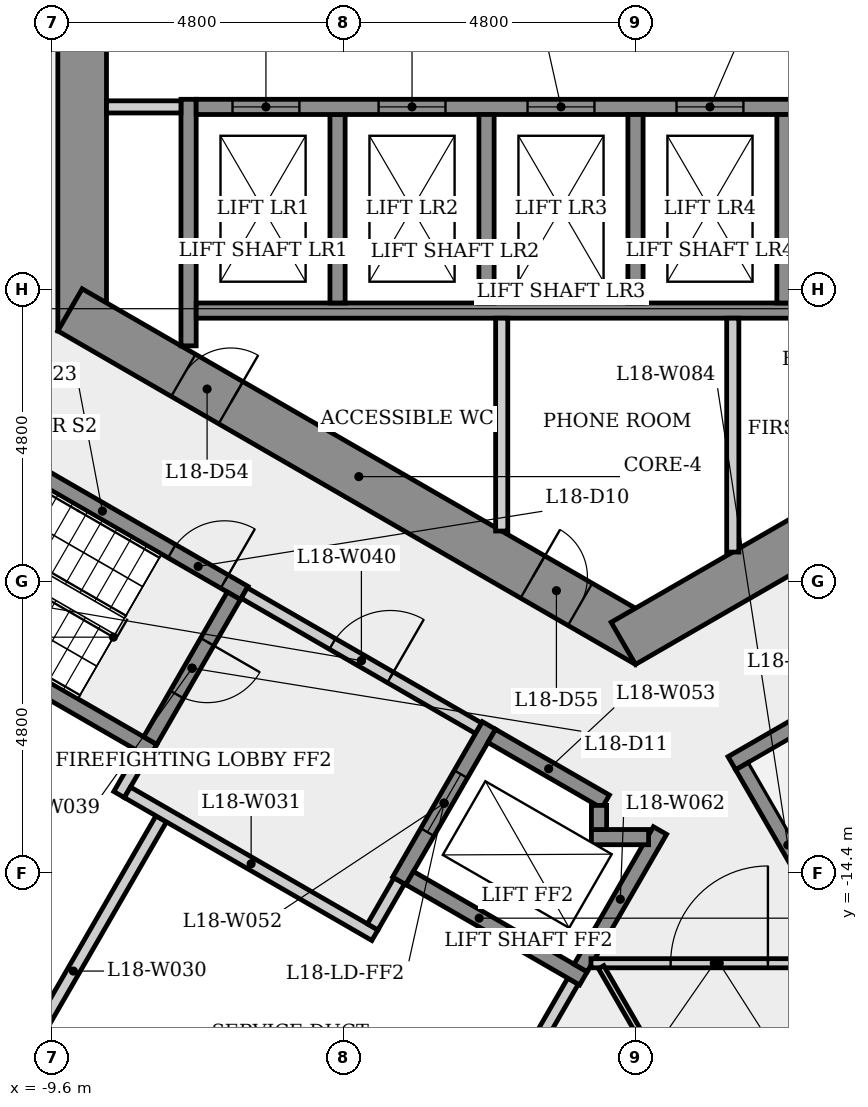
"""IFC4 building model, lengths in metres.
Left out: names, types, materials, properties, quantities, classifications, styles, units other than length and angle.
Written with IfcOpenShell. Run it as: python <this file> out.ifc"""

import sys

from ifc_helpers import new_model, si_unit, direction, frame, frame_2d, origin, place, context, subcontext, project, spatial, rectangle, extrude, element, fill, save


model = new_model("IFC4")
c1 = context("Model", 3, precision=1e-05, world=origin(), true_north=direction((0.0, 1.0)))
c2 = subcontext(c1, "Body", "Model", "MODEL_VIEW")
j1 = project(units=[si_unit("LENGTHUNIT", "METRE"), si_unit("PLANEANGLEUNIT", "RADIAN")], contexts=[c1])
p1 = place(None, origin())
s1 = spatial("IfcSite", under=j1, at=p1, CompositionType="ELEMENT")
p2 = place(p1, origin())
s2 = spatial("IfcBuilding", under=s1, at=p2, CompositionType="ELEMENT")
p3 = place(p2, frame((0.0, 0.0, 70.3)))
s3 = spatial("IfcBuildingStorey", under=s2, at=p3, CompositionType="ELEMENT", Elevation=70.3)
p4 = place(p3, frame((-9.1, 5.485, 0.0), z_axis=(0.0, 0.0, 1.0), x_axis=(0.0, -1.0, 0.0)))
e1 = element("IfcWall", 1, at=p4, inside=s3, PredefinedType="SHEAR", context=c2, shape_type="SweptSolid", body=[
    extrude(rectangle(XDim=10.97, YDim=0.8, at=frame_2d((5.485, 0.0))), origin(), (0.0, 0.0, 1.0), 4.0),
])
p5 = place(p4, frame((4.685, 0.0, 0.0)))
e2 = element("IfcOpeningElement", 2, at=p5, cuts=e1, PredefinedType="OPENING", context=c2, shape_type="SweptSolid", body=[
    extrude(rectangle(XDim=1.6, YDim=2.1, at=frame_2d((0.8, 1.05))), frame((0.0, 0.41, 0.0), z_axis=(0.0, -1.0, 0.0), x_axis=(1.0, 0.0, 0.0)), (0.0, 0.0, 1.0), 0.82),
])
p6 = place(p3, frame((-9.3, -5.138, 0.0), z_axis=(0.0, 0.0, 1.0), x_axis=(0.866023993627, -0.500002442456, 0.0)))
e3 = element("IfcWall", 3, at=p6, inside=s3, PredefinedType="SHEAR", context=c2, shape_type="SweptSolid", body=[
    extrude(rectangle(XDim=10.97, YDim=0.8, at=frame_2d((5.485, 0.0))), origin(), (0.0, 0.0, 1.0), 4.0),
])
p7 = place(p6, frame((2.153, 0.0, 0.0)))
e4 = element("IfcOpeningElement", 4, at=p7, cuts=e3, PredefinedType="OPENING", context=c2, shape_type="SweptSolid", body=[
    extrude(rectangle(XDim=0.9, YDim=2.1, at=frame_2d((0.45, 1.05))), frame((0.0, 0.41, 0.0), z_axis=(0.0, -1.0, 0.0), x_axis=(1.0, 0.0, 0.0)), (0.0, 0.0, 1.0), 0.82),
])
p8 = place(p6, frame((8.787, 0.0, 0.0)))
e5 = element("IfcOpeningElement", 5, at=p8, cuts=e3, PredefinedType="OPENING", context=c2, shape_type="SweptSolid", body=[
    extrude(rectangle(XDim=0.9, YDim=2.1, at=frame_2d((0.45, 1.05))), frame((0.0, 0.41, 0.0), z_axis=(0.0, -1.0, 0.0), x_axis=(1.0, 0.0, 0.0)), (0.0, 0.0, 1.0), 0.82),
])
p9 = place(p3, frame((-0.2, -10.623, 0.0), z_axis=(0.0, 0.0, 1.0), x_axis=(0.866023993627, 0.500002442456, 0.0)))
e6 = element("IfcWall", 6, at=p9, inside=s3, PredefinedType="SHEAR", context=c2, shape_type="SweptSolid", body=[
    extrude(rectangle(XDim=10.97, YDim=0.8, at=frame_2d((5.485, 0.0))), origin(), (0.0, 0.0, 1.0), 4.0),
])
p10 = place(p9, frame((7.57, 0.0, 0.0)))
e7 = element("IfcOpeningElement", 7, at=p10, cuts=e6, PredefinedType="OPENING", context=c2, shape_type="SweptSolid", body=[
    extrude(rectangle(XDim=0.9, YDim=2.1, at=frame_2d((0.45, 1.05))), frame((0.0, 0.41, 0.0), z_axis=(0.0, -1.0, 0.0), x_axis=(1.0, 0.0, 0.0)), (0.0, 0.0, 1.0), 0.82),
])
p11 = place(p3, frame((-11.1, -7.101, 0.0), z_axis=(0.0, 0.0, 1.0), x_axis=(0.866028615007, -0.499994437958, 0.0)))
e8 = element("IfcWall", 8, at=p11, inside=s3, PredefinedType="SHEAR", context=c2, shape_type="SweptSolid", body=[
    extrude(rectangle(XDim=5.387, YDim=0.25, at=frame_2d((2.694, 0.0))), origin(), (0.0, 0.0, 1.0), 3.6),
])
p12 = place(p11, frame((4.012, 0.0, 0.0)))
e9 = element("IfcOpeningElement", 9, at=p12, cuts=e8, PredefinedType="OPENING", context=c2, shape_type="SweptSolid", body=[
    extrude(rectangle(XDim=1.0, YDim=2.1, at=frame_2d((0.5, 1.05))), frame((0.0, 0.135, 0.0), z_axis=(0.0, -1.0, 0.0), x_axis=(1.0, 0.0, 0.0)), (0.0, 0.0, 1.0), 0.27),
])
p13 = place(p3, frame((-8.493, -13.11, 0.0), z_axis=(0.0, 0.0, 1.0), x_axis=(0.500067724834, 0.865986299303, 0.0)))
e10 = element("IfcWall", 10, at=p13, inside=s3, PredefinedType="PLUMBINGWALL", context=c2, shape_type="SweptSolid", body=[
    extrude(rectangle(XDim=0.775, YDim=0.2, at=frame_2d((0.388, 0.0))), origin(), (0.0, 0.0, 1.0), 3.6),
])
p14 = place(p3, frame((-7.935, -12.393, 0.0), z_axis=(0.0, 0.0, 1.0), x_axis=(-0.866025499775, 0.499999833739, 0.0)))
e11 = element("IfcWall", 11, at=p14, inside=s3, PredefinedType="SHEAR", context=c2, shape_type="SweptSolid", body=[
    extrude(rectangle(XDim=6.4, YDim=0.25, at=frame_2d((3.2, 0.0))), origin(), (0.0, 0.0, 1.0), 3.6),
])
p15 = place(p3, frame((-7.8, -13.51, 0.0), z_axis=(0.0, 0.0, 1.0), x_axis=(-0.499982030767, -0.866035778077, 0.0)))
e12 = element("IfcWall", 12, at=p15, inside=s3, PredefinedType="PLUMBINGWALL", context=c2, shape_type="SweptSolid", body=[
    extrude(rectangle(XDim=5.781, YDim=0.2, at=frame_2d((2.89, 0.0))), origin(), (0.0, 0.0, 1.0), 3.6),
])
p16 = place(p3, frame((-8.356, -13.073, 0.0), z_axis=(0.0, 0.0, 1.0), x_axis=(0.866038532462, -0.499977259774, 0.0)))
e13 = element("IfcWall", 13, at=p16, inside=s3, PredefinedType="PLUMBINGWALL", context=c2, shape_type="SweptSolid", body=[
    extrude(rectangle(XDim=4.7, YDim=0.2, at=frame_2d((2.35, 0.0))), origin(), (0.0, 0.0, 1.0), 3.6),
])
p17 = place(p3, frame((-7.35, -5.73, 0.0), z_axis=(0.0, 0.0, 1.0), x_axis=(0.0, 1.0, 0.0)))
e14 = element("IfcWall", 14, at=p17, inside=s3, PredefinedType="SHEAR", context=c2, shape_type="SweptSolid", body=[
    extrude(rectangle(XDim=4.055, YDim=0.25, at=frame_2d((2.028, 0.0))), origin(), (0.0, 0.0, 1.0), 3.6),
])
p18 = place(p3, frame((-7.475, -1.8, 0.0), z_axis=(0.0, 0.0, 1.0), x_axis=(-1.0, 0.0, 0.0)))
e15 = element("IfcWall", 15, at=p18, inside=s3, PredefinedType="PARTITIONING", context=c2, shape_type="SweptSolid", body=[
    extrude(rectangle(XDim=1.225, YDim=0.2, at=frame_2d((0.613, 0.0))), origin(), (0.0, 0.0, 1.0), 3.6),
])
p19 = place(p3, frame((-6.605, -9.841, 0.0), z_axis=(0.0, 0.0, 1.0), x_axis=(-0.499996545922, -0.866027397988, 0.0)))
e16 = element("IfcWall", 16, at=p19, inside=s3, PredefinedType="SHEAR", context=c2, shape_type="SweptSolid", body=[
    extrude(rectangle(XDim=2.75, YDim=0.25, at=frame_2d((1.375, 0.0))), origin(), (0.0, 0.0, 1.0), 3.6),
])
p20 = place(p19, frame((0.875, 0.0, 0.0)))
e17 = element("IfcOpeningElement", 17, at=p20, cuts=e16, PredefinedType="OPENING", context=c2, shape_type="SweptSolid", body=[
    extrude(rectangle(XDim=1.0, YDim=2.1, at=frame_2d((0.5, 1.05))), frame((0.0, 0.135, 0.0), z_axis=(0.0, -1.0, 0.0), x_axis=(1.0, 0.0, 0.0)), (0.0, 0.0, 1.0), 0.27),
])
p21 = place(p3, frame((-6.435, -9.795, 0.0), z_axis=(0.0, 0.0, 1.0), x_axis=(0.866012907634, -0.500021643343, 0.0)))
e18 = element("IfcWall", 18, at=p21, inside=s3, PredefinedType="PARTITIONING", context=c2, shape_type="SweptSolid", body=[
    extrude(rectangle(XDim=4.45, YDim=0.2, at=frame_2d((2.225, 0.0))), origin(), (0.0, 0.0, 1.0), 3.6),
])
p22 = place(p21, frame((1.675, 0.0, 0.0)))
e19 = element("IfcOpeningElement", 19, at=p22, cuts=e18, PredefinedType="OPENING", context=c2, shape_type="SweptSolid", body=[
    extrude(rectangle(XDim=1.1, YDim=2.1, at=frame_2d((0.55, 1.05))), frame((0.0, 0.11, 0.0), z_axis=(0.0, -1.0, 0.0), x_axis=(1.0, 0.0, 0.0)), (0.0, 0.0, 1.0), 0.22),
])
p23 = place(p3, frame((-7.225, -5.15, 0.0), z_axis=(0.0, 0.0, 1.0), x_axis=(1.0, 0.0, 0.0)))
e20 = element("IfcWall", 20, at=p23, inside=s3, PredefinedType="SHEAR", context=c2, shape_type="SweptSolid", body=[
    extrude(rectangle(XDim=14.7, YDim=0.25, at=frame_2d((7.35, 0.0))), origin(), (0.0, 0.0, 1.0), 3.6),
])
p24 = place(p3, frame((-4.9, -1.925, 0.0), z_axis=(0.0, 0.0, 1.0), x_axis=(0.0, -1.0, 0.0)))
e21 = element("IfcWall", 21, at=p24, inside=s3, PredefinedType="SHEAR", context=c2, shape_type="SweptSolid", body=[
    extrude(rectangle(XDim=3.1, YDim=0.25, at=frame_2d((1.55, 0.0))), origin(), (0.0, 0.0, 1.0), 4.0),
])
p25 = place(p3, frame((-7.225, -1.8, 0.0), z_axis=(0.0, 0.0, 1.0), x_axis=(1.0, 0.0, 0.0)))
e22 = element("IfcWall", 22, at=p25, inside=s3, PredefinedType="SHEAR", context=c2, shape_type="SweptSolid", body=[
    extrude(rectangle(XDim=14.7, YDim=0.25, at=frame_2d((7.35, 0.0))), origin(), (0.0, 0.0, 1.0), 3.6),
])
p26 = place(p25, frame((0.597, 0.0, 0.0)))
e23 = element("IfcOpeningElement", 23, at=p26, cuts=e22, PredefinedType="OPENING", context=c2, shape_type="SweptSolid", body=[
    extrude(rectangle(XDim=1.1, YDim=2.1, at=frame_2d((0.55, 1.05))), frame((0.0, 0.135, 0.0), z_axis=(0.0, -1.0, 0.0), x_axis=(1.0, 0.0, 0.0)), (0.0, 0.0, 1.0), 0.27),
])
p27 = place(p25, frame((3.0, 0.0, 0.0)))
e24 = element("IfcOpeningElement", 24, at=p27, cuts=e22, PredefinedType="OPENING", context=c2, shape_type="SweptSolid", body=[
    extrude(rectangle(XDim=1.1, YDim=2.1, at=frame_2d((0.55, 1.05))), frame((0.0, 0.135, 0.0), z_axis=(0.0, -1.0, 0.0), x_axis=(1.0, 0.0, 0.0)), (0.0, 0.0, 1.0), 0.27),
])
p28 = place(p25, frame((5.45, 0.0, 0.0)))
e25 = element("IfcOpeningElement", 25, at=p28, cuts=e22, PredefinedType="OPENING", context=c2, shape_type="SweptSolid", body=[
    extrude(rectangle(XDim=1.1, YDim=2.1, at=frame_2d((0.55, 1.05))), frame((0.0, 0.135, 0.0), z_axis=(0.0, -1.0, 0.0), x_axis=(1.0, 0.0, 0.0)), (0.0, 0.0, 1.0), 0.27),
])
p29 = place(p25, frame((7.9, 0.0, 0.0)))
e26 = element("IfcOpeningElement", 26, at=p29, cuts=e22, PredefinedType="OPENING", context=c2, shape_type="SweptSolid", body=[
    extrude(rectangle(XDim=1.1, YDim=2.1, at=frame_2d((0.55, 1.05))), frame((0.0, 0.135, 0.0), z_axis=(0.0, -1.0, 0.0), x_axis=(1.0, 0.0, 0.0)), (0.0, 0.0, 1.0), 0.27),
])
p30 = place(p25, frame((10.35, 0.0, 0.0)))
e27 = element("IfcOpeningElement", 27, at=p30, cuts=e22, PredefinedType="OPENING", context=c2, shape_type="SweptSolid", body=[
    extrude(rectangle(XDim=1.1, YDim=2.1, at=frame_2d((0.55, 1.05))), frame((0.0, 0.135, 0.0), z_axis=(0.0, -1.0, 0.0), x_axis=(1.0, 0.0, 0.0)), (0.0, 0.0, 1.0), 0.27),
])
p31 = place(p3, frame((-3.885, -14.529, 0.0), z_axis=(0.0, 0.0, 1.0), x_axis=(-0.499859285417, -0.866106630146, 0.0)))
e28 = element("IfcWall", 28, at=p31, inside=s3, PredefinedType="PLUMBINGWALL", context=c2, shape_type="SweptSolid", body=[
    extrude(rectangle(XDim=0.875, YDim=0.2, at=frame_2d((0.438, 0.0))), origin(), (0.0, 0.0, 1.0), 3.6),
])
p32 = place(p3, frame((-2.41, -11.974, 0.0), z_axis=(0.0, 0.0, 1.0), x_axis=(-0.500001826776, -0.866024349092, 0.0)))
e29 = element("IfcWall", 29, at=p32, inside=s3, PredefinedType="SHEAR", context=c2, shape_type="SweptSolid", body=[
    extrude(rectangle(XDim=2.95, YDim=0.25, at=frame_2d((1.475, 0.0))), origin(), (0.0, 0.0, 1.0), 3.6),
])
p33 = place(p32, frame((0.925, 0.0, 0.0)))
e30 = element("IfcOpeningElement", 30, at=p33, cuts=e29, PredefinedType="OPENING", context=c2, shape_type="SweptSolid", body=[
    extrude(rectangle(XDim=1.1, YDim=2.1, at=frame_2d((0.55, 1.05))), frame((0.0, 0.135, 0.0), z_axis=(0.0, -1.0, 0.0), x_axis=(1.0, 0.0, 0.0)), (0.0, 0.0, 1.0), 0.27),
])
p34 = place(p3, frame((-2.364, -12.145, 0.0), z_axis=(0.0, 0.0, 1.0), x_axis=(0.86603892542, -0.499976579108, 0.0)))
e31 = element("IfcWall", 31, at=p34, inside=s3, PredefinedType="SHEAR", context=c2, shape_type="SweptSolid", body=[
    extrude(rectangle(XDim=2.162, YDim=0.25, at=frame_2d((1.081, 0.0))), origin(), (0.0, 0.0, 1.0), 3.6),
])
p35 = place(p3, frame((-2.45, -1.925, 0.0), z_axis=(0.0, 0.0, 1.0), x_axis=(0.0, -1.0, 0.0)))
e32 = element("IfcWall", 32, at=p35, inside=s3, PredefinedType="SHEAR", context=c2, shape_type="SweptSolid", body=[
    extrude(rectangle(XDim=3.1, YDim=0.25, at=frame_2d((1.55, 0.0))), origin(), (0.0, 0.0, 1.0), 4.0),
])
p36 = place(p3, frame((-2.2, -5.275, 0.0), z_axis=(0.0, 0.0, 1.0), x_axis=(0.0, -1.0, 0.0)))
e33 = element("IfcWall", 33, at=p36, inside=s3, PredefinedType="PARTITIONING", context=c2, shape_type="SweptSolid", body=[
    extrude(rectangle(XDim=3.501, YDim=0.2, at=frame_2d((1.75, 0.0))), origin(), (0.0, 0.0, 1.0), 3.6),
])
p37 = place(p3, frame((-1.027, -16.179, 0.0), z_axis=(0.0, 0.0, 1.0), x_axis=(-0.499984476993, -0.866034365811, 0.0)))
e34 = element("IfcWall", 34, at=p37, inside=s3, PredefinedType="PLUMBINGWALL", context=c2, shape_type="SweptSolid", body=[
    extrude(rectangle(XDim=6.856, YDim=0.2, at=frame_2d((3.428, 0.0))), origin(), (0.0, 0.0, 1.0), 3.6),
])
p38 = place(p3, frame((-0.856, -16.133, 0.0), z_axis=(0.0, 0.0, 1.0), x_axis=(-0.866021716278, 0.500006386895, 0.0)))
e35 = element("IfcWall", 35, at=p38, inside=s3, PredefinedType="SHEAR", context=c2, shape_type="SweptSolid", body=[
    extrude(rectangle(XDim=3.3, YDim=0.25, at=frame_2d((1.65, 0.0))), origin(), (0.0, 0.0, 1.0), 3.6),
])
p39 = place(p3, frame((-0.902, -15.962, 0.0), z_axis=(0.0, 0.0, 1.0), x_axis=(0.499981517636, 0.866036074319, 0.0)))
e36 = element("IfcWall", 36, at=p39, inside=s3, PredefinedType="SHEAR", context=c2, shape_type="SweptSolid", body=[
    extrude(rectangle(XDim=2.61, YDim=0.25, at=frame_2d((1.305, 0.0))), origin(), (0.0, 0.0, 1.0), 3.6),
])
p40 = place(p3, frame((-0.732, -15.885, 0.0), z_axis=(0.0, 0.0, 1.0), x_axis=(1.0, 0.0, 0.0)))
e37 = element("IfcWall", 37, at=p40, inside=s3, PredefinedType="PARTITIONING", context=c2, shape_type="SweptSolid", body=[
    extrude(rectangle(XDim=4.056, YDim=0.15, at=frame_2d((2.028, 0.0))), origin(), (0.0, 0.0, 1.0), 3.6),
])
p41 = place(p40, frame((1.31, 0.0, 0.0)))
e38 = element("IfcOpeningElement", 38, at=p41, cuts=e37, PredefinedType="OPENING", context=c2, shape_type="SweptSolid", body=[
    extrude(rectangle(XDim=1.6, YDim=2.1, at=frame_2d((0.8, 1.05))), frame((0.0, 0.085, 0.0), z_axis=(0.0, -1.0, 0.0), x_axis=(1.0, 0.0, 0.0)), (0.0, 0.0, 1.0), 0.17),
])
p42 = place(p3, frame((-0.725, -13.81, 0.0), z_axis=(0.0, 0.0, 1.0), x_axis=(1.0, 0.0, 0.0)))
e39 = element("IfcWall", 39, at=p42, inside=s3, PredefinedType="SHEAR", context=c2, shape_type="SweptSolid", body=[
    extrude(rectangle(XDim=0.941, YDim=0.25, at=frame_2d((0.47, 0.0))), origin(), (0.0, 0.0, 1.0), 4.0),
])
p43 = place(p3, frame((-0.6, -13.289, 0.0), z_axis=(0.0, 0.0, 1.0), x_axis=(0.0, -1.0, 0.0)))
e40 = element("IfcWall", 40, at=p43, inside=s3, PredefinedType="SHEAR", context=c2, shape_type="SweptSolid", body=[
    extrude(rectangle(XDim=0.396, YDim=0.25, at=frame_2d((0.198, 0.0))), origin(), (0.0, 0.0, 1.0), 4.0),
])
p44 = place(p3, frame((0.0, -1.925, 0.0), z_axis=(0.0, 0.0, 1.0), x_axis=(0.0, -1.0, 0.0)))
e41 = element("IfcWall", 41, at=p44, inside=s3, PredefinedType="SHEAR", context=c2, shape_type="SweptSolid", body=[
    extrude(rectangle(XDim=3.1, YDim=0.25, at=frame_2d((1.55, 0.0))), origin(), (0.0, 0.0, 1.0), 4.0),
])
p45 = place(p3, frame((1.6, -5.275, 0.0), z_axis=(0.0, 0.0, 1.0), x_axis=(0.0, -1.0, 0.0)))
e42 = element("IfcWall", 42, at=p45, inside=s3, PredefinedType="PARTITIONING", context=c2, shape_type="SweptSolid", body=[
    extrude(rectangle(XDim=3.847, YDim=0.2, at=frame_2d((1.924, 0.0))), origin(), (0.0, 0.0, 1.0), 3.6),
])
p46 = place(p3, frame((1.585, -12.595, 0.0), z_axis=(0.0, 0.0, 1.0), x_axis=(0.866036417653, 0.499980922934, 0.0)))
e43 = element("IfcWall", 43, at=p46, inside=s3, PredefinedType="SHEAR", context=c2, shape_type="SweptSolid", body=[
    extrude(rectangle(XDim=6.65, YDim=0.25, at=frame_2d((3.325, 0.0))), origin(), (0.0, 0.0, 1.0), 3.6),
])
p47 = place(p46, frame((5.275, 0.0, 0.0)))
e44 = element("IfcOpeningElement", 44, at=p47, cuts=e43, PredefinedType="OPENING", context=c2, shape_type="SweptSolid", body=[
    extrude(rectangle(XDim=1.0, YDim=2.1, at=frame_2d((0.5, 1.05))), frame((0.0, 0.135, 0.0), z_axis=(0.0, -1.0, 0.0), x_axis=(1.0, 0.0, 0.0)), (0.0, 0.0, 1.0), 0.27),
])
p48 = place(p3, frame((2.45, -1.925, 0.0), z_axis=(0.0, 0.0, 1.0), x_axis=(0.0, -1.0, 0.0)))
e45 = element("IfcWall", 45, at=p48, inside=s3, PredefinedType="SHEAR", context=c2, shape_type="SweptSolid", body=[
    extrude(rectangle(XDim=3.1, YDim=0.25, at=frame_2d((1.55, 0.0))), origin(), (0.0, 0.0, 1.0), 4.0),
])
p49 = place(p3, frame((-0.565, -15.949, 0.0), z_axis=(0.0, 0.0, 1.0), x_axis=(0.500000334318, -0.866025210766, 0.0)))
e46 = element("IfcWall", 46, at=p49, inside=s3, PredefinedType="PARTITIONING", context=c2, shape_type="SweptSolid", body=[
    extrude(rectangle(XDim=22.638, YDim=0.1, at=frame_2d((11.319, 0.0))), origin(), (0.0, 0.0, 1.0), 3.6),
])
p50 = place(p49, frame((3.081, 0.0, 0.0)))
e47 = element("IfcOpeningElement", 47, at=p50, cuts=e46, PredefinedType="OPENING", context=c2, shape_type="SweptSolid", body=[
    extrude(rectangle(XDim=1.0, YDim=2.1, at=frame_2d((0.5, 1.05))), frame((0.0, 0.06, 0.0), z_axis=(0.0, -1.0, 0.0), x_axis=(1.0, 0.0, 0.0)), (0.0, 0.0, 1.0), 0.12),
])
p51 = place(p49, frame((9.817, 0.0, 0.0)))
e48 = element("IfcOpeningElement", 48, at=p51, cuts=e46, PredefinedType="OPENING", context=c2, shape_type="SweptSolid", body=[
    extrude(rectangle(XDim=1.6, YDim=2.1, at=frame_2d((0.8, 1.05))), frame((0.0, 0.06, 0.0), z_axis=(0.0, -1.0, 0.0), x_axis=(1.0, 0.0, 0.0)), (0.0, 0.0, 1.0), 0.12),
])
p52 = place(p49, frame((17.182, 0.0, 0.0)))
e49 = element("IfcOpeningElement", 49, at=p52, cuts=e46, PredefinedType="OPENING", context=c2, shape_type="SweptSolid", body=[
    extrude(rectangle(XDim=1.6, YDim=2.1, at=frame_2d((0.8, 1.05))), frame((0.0, 0.06, 0.0), z_axis=(0.0, -1.0, 0.0), x_axis=(1.0, 0.0, 0.0)), (0.0, 0.0, 1.0), 0.12),
])
p53 = place(p3, frame((3.256, -15.239, 0.0), z_axis=(0.0, 0.0, 1.0), x_axis=(-0.50002537861, 0.866010750942, 0.0)))
e50 = element("IfcWall", 50, at=p53, inside=s3, PredefinedType="SHEAR", context=c2, shape_type="SweptSolid", body=[
    extrude(rectangle(XDim=3.0, YDim=0.25, at=frame_2d((1.5, 0.0))), origin(), (0.0, 0.0, 1.0), 3.6),
])
p54 = place(p26, origin())
e51 = element("IfcDoor", 51, at=p54, inside=s3, OperationType="SLIDING_TO_LEFT", PredefinedType="DOOR", context=c2, shape_type="SweptSolid", body=[
    extrude(rectangle(XDim=1.1, YDim=2.1, at=frame_2d((0.55, 1.05))), frame((0.0, 0.025, 0.0), z_axis=(0.0, -1.0, 0.0), x_axis=(1.0, 0.0, 0.0)), (0.0, 0.0, 1.0), 0.05),
])
fill(e23, e51)
p55 = place(p27, origin())
e52 = element("IfcDoor", 52, at=p55, inside=s3, OperationType="SLIDING_TO_LEFT", PredefinedType="DOOR", context=c2, shape_type="SweptSolid", body=[
    extrude(rectangle(XDim=1.1, YDim=2.1, at=frame_2d((0.55, 1.05))), frame((0.0, 0.025, 0.0), z_axis=(0.0, -1.0, 0.0), x_axis=(1.0, 0.0, 0.0)), (0.0, 0.0, 1.0), 0.05),
])
fill(e24, e52)
p56 = place(p28, origin())
e53 = element("IfcDoor", 53, at=p56, inside=s3, OperationType="SLIDING_TO_LEFT", PredefinedType="DOOR", context=c2, shape_type="SweptSolid", body=[
    extrude(rectangle(XDim=1.1, YDim=2.1, at=frame_2d((0.55, 1.05))), frame((0.0, 0.025, 0.0), z_axis=(0.0, -1.0, 0.0), x_axis=(1.0, 0.0, 0.0)), (0.0, 0.0, 1.0), 0.05),
])
fill(e25, e53)
p57 = place(p29, origin())
e54 = element("IfcDoor", 54, at=p57, inside=s3, OperationType="SLIDING_TO_LEFT", PredefinedType="DOOR", context=c2, shape_type="SweptSolid", body=[
    extrude(rectangle(XDim=1.1, YDim=2.1, at=frame_2d((0.55, 1.05))), frame((0.0, 0.025, 0.0), z_axis=(0.0, -1.0, 0.0), x_axis=(1.0, 0.0, 0.0)), (0.0, 0.0, 1.0), 0.05),
])
fill(e26, e54)
p58 = place(p12, origin())
e55 = element("IfcDoor", 55, at=p58, inside=s3, OperationType="SINGLE_SWING_RIGHT", PredefinedType="DOOR", context=c2, shape_type="SweptSolid", body=[
    extrude(rectangle(XDim=1.0, YDim=2.1, at=frame_2d((0.5, 1.05))), frame((0.0, 0.025, 0.0), z_axis=(0.0, -1.0, 0.0), x_axis=(1.0, 0.0, 0.0)), (0.0, 0.0, 1.0), 0.05),
])
fill(e9, e55)
p59 = place(p20, origin())
e56 = element("IfcDoor", 56, at=p59, inside=s3, OperationType="SINGLE_SWING_LEFT", PredefinedType="DOOR", context=c2, shape_type="SweptSolid", body=[
    extrude(rectangle(XDim=1.0, YDim=2.1, at=frame_2d((0.5, 1.05))), frame((0.0, 0.025, 0.0), z_axis=(0.0, -1.0, 0.0), x_axis=(1.0, 0.0, 0.0)), (0.0, 0.0, 1.0), 0.05),
])
fill(e17, e56)
p60 = place(p22, origin())
e57 = element("IfcDoor", 57, at=p60, inside=s3, OperationType="SINGLE_SWING_RIGHT", PredefinedType="DOOR", context=c2, shape_type="SweptSolid", body=[
    extrude(rectangle(XDim=1.1, YDim=2.1, at=frame_2d((0.55, 1.05))), frame((0.0, 0.025, 0.0), z_axis=(0.0, -1.0, 0.0), x_axis=(1.0, 0.0, 0.0)), (0.0, 0.0, 1.0), 0.05),
])
fill(e19, e57)
p61 = place(p33, origin())
e58 = element("IfcDoor", 58, at=p61, inside=s3, OperationType="SLIDING_TO_LEFT", PredefinedType="DOOR", context=c2, shape_type="SweptSolid", body=[
    extrude(rectangle(XDim=1.1, YDim=2.1, at=frame_2d((0.55, 1.05))), frame((0.0, 0.025, 0.0), z_axis=(0.0, -1.0, 0.0), x_axis=(1.0, 0.0, 0.0)), (0.0, 0.0, 1.0), 0.05),
])
fill(e30, e58)
p62 = place(p41, origin())
e59 = element("IfcDoor", 59, at=p62, inside=s3, OperationType="SINGLE_SWING_RIGHT", PredefinedType="DOOR", context=c2, shape_type="SweptSolid", body=[
    extrude(rectangle(XDim=1.6, YDim=2.1, at=frame_2d((0.8, 1.05))), frame((0.0, 0.025, 0.0), z_axis=(0.0, -1.0, 0.0), x_axis=(1.0, 0.0, 0.0)), (0.0, 0.0, 1.0), 0.05),
])
fill(e38, e59)
p63 = place(p7, origin())
e60 = element("IfcDoor", 60, at=p63, inside=s3, OperationType="SINGLE_SWING_RIGHT", PredefinedType="DOOR", context=c2, shape_type="SweptSolid", body=[
    extrude(rectangle(XDim=0.9, YDim=2.1, at=frame_2d((0.45, 1.05))), frame((0.0, 0.025, 0.0), z_axis=(0.0, -1.0, 0.0), x_axis=(1.0, 0.0, 0.0)), (0.0, 0.0, 1.0), 0.05),
])
fill(e4, e60)
p64 = place(p8, origin())
e61 = element("IfcDoor", 61, at=p64, inside=s3, OperationType="SINGLE_SWING_LEFT", PredefinedType="DOOR", context=c2, shape_type="SweptSolid", body=[
    extrude(rectangle(XDim=0.9, YDim=2.1, at=frame_2d((0.45, 1.05))), frame((0.0, 0.025, 0.0), z_axis=(0.0, -1.0, 0.0), x_axis=(1.0, 0.0, 0.0)), (0.0, 0.0, 1.0), 0.05),
])
fill(e5, e61)
save(model, sys.argv[1])
